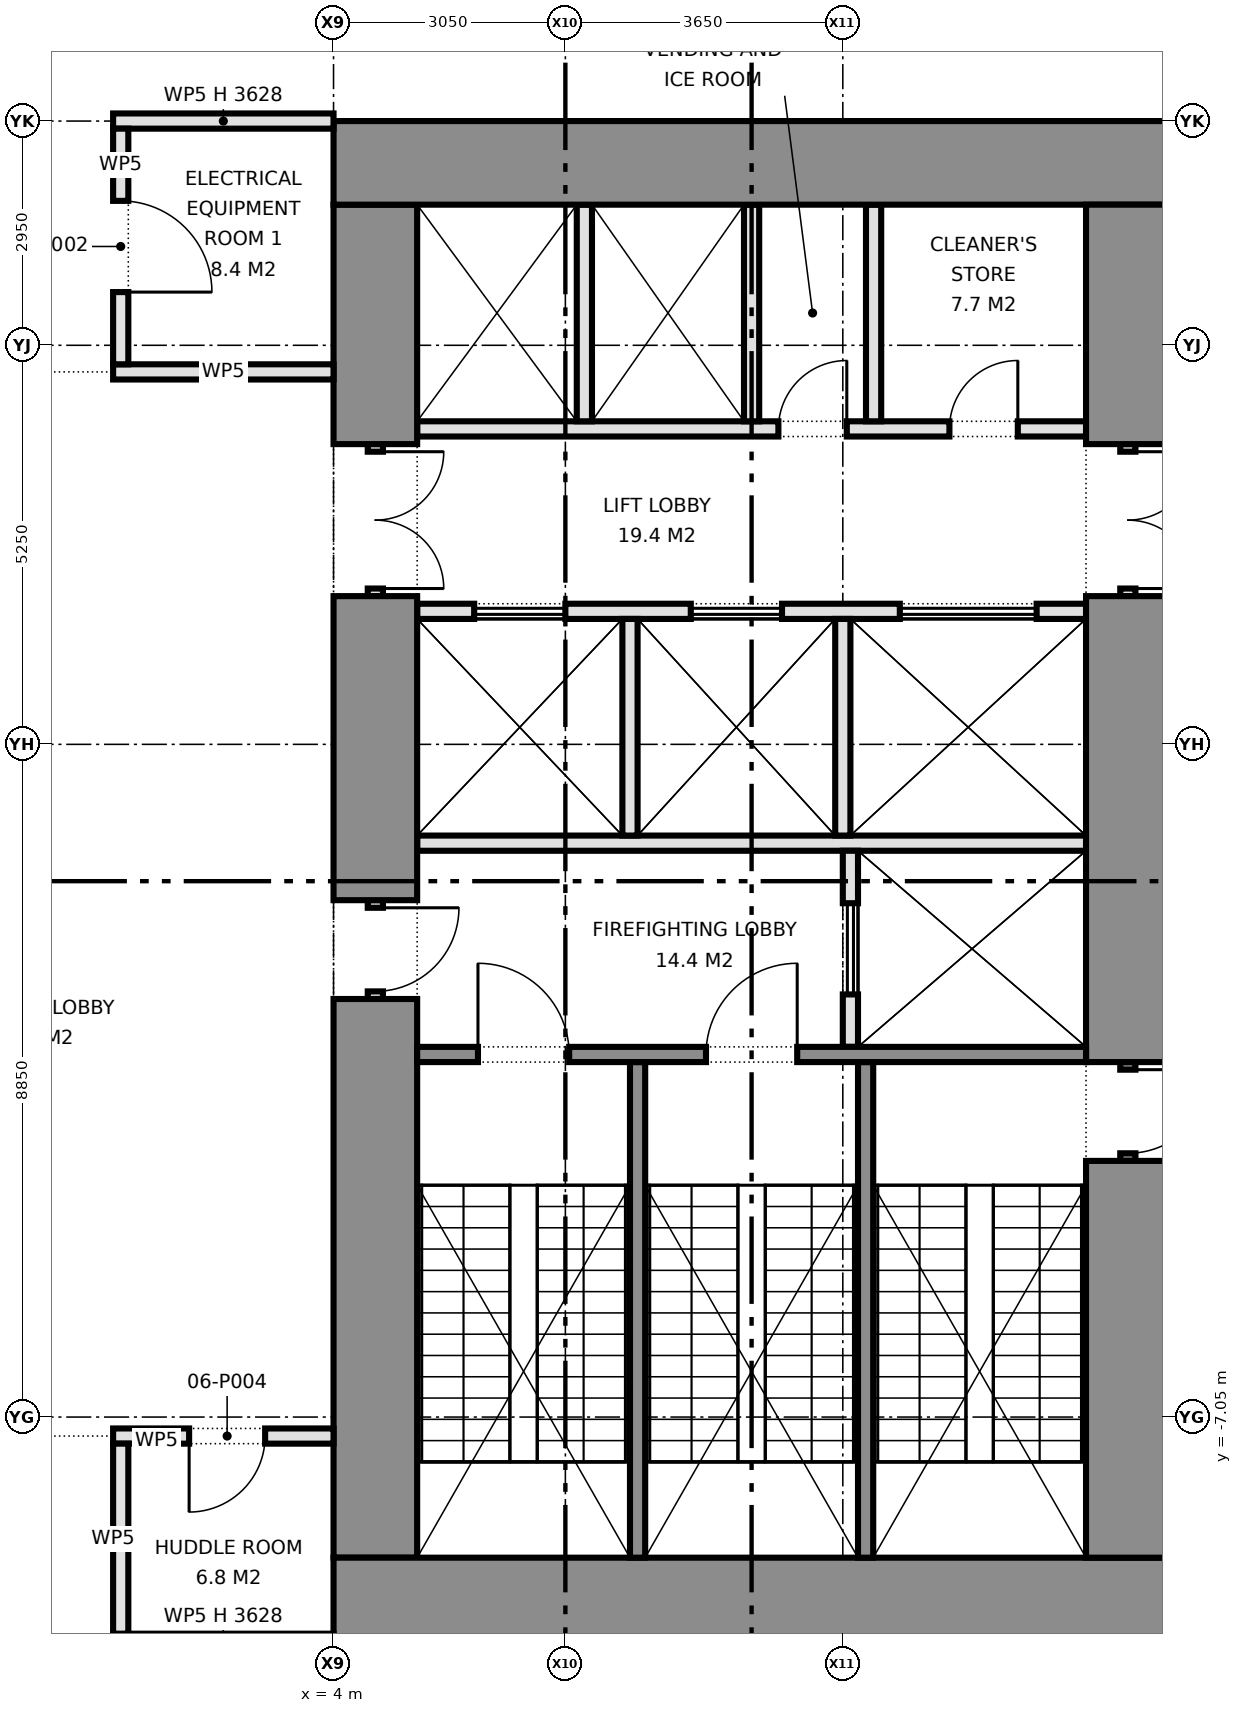
"""IFC4 building model, lengths in metres.
Left out: names, types, materials, properties, quantities, classifications, styles, units other than length and angle.
Written with IfcOpenShell. Run it as: python <this file> out.ifc"""

import sys

from ifc_helpers import new_model, si_unit, direction, frame, frame_2d, origin, place, context, subcontext, project, spatial, rectangle, extrude, element, fill, save


model = new_model("IFC4")
c1 = context("Model", 3, precision=1e-05, world=origin(), true_north=direction((0.0, 1.0)))
c2 = subcontext(c1, "Body", "Model", "MODEL_VIEW")
j1 = project(units=[si_unit("LENGTHUNIT", "METRE"), si_unit("PLANEANGLEUNIT", "RADIAN")], contexts=[c1])
p1 = place(None, origin())
s1 = spatial("IfcSite", under=j1, at=p1, CompositionType="ELEMENT")
p2 = place(p1, origin())
s2 = spatial("IfcBuilding", under=s1, at=p2, CompositionType="ELEMENT")
p3 = place(p2, frame((0.0, 0.0, 25.7)))
s3 = spatial("IfcBuildingStorey", under=s2, at=p3, CompositionType="ELEMENT", Elevation=25.7)
for number, where, z_axis, x_axis in (
    (1, (15.0, 9.45, 0.0), (0.0, 0.0, 1.0), (-1.0, 0.0, 0.0)),
    (2, (15.0, -9.45, 0.0), (0.0, 0.0, 1.0), (-1.0, 0.0, 0.0)),
):
    element("IfcWall", number, at=place(p3, frame(where, z_axis=z_axis, x_axis=x_axis)), inside=s3, PredefinedType="SHEAR", context=c2, shape_type="SweptSolid", body=[
        extrude(rectangle(XDim=11.0, YDim=1.1, at=frame_2d((5.5, 0.0))), origin(), (0.0, 0.0, 1.0), 4.575),
    ])
p4 = place(p3, frame((14.45, 8.9, 0.0), z_axis=(0.0, 0.0, 1.0), x_axis=(0.0, -1.0, 0.0)))
e3 = element("IfcWall", 3, at=p4, inside=s3, PredefinedType="SHEAR", context=c2, shape_type="SweptSolid", body=[
    extrude(rectangle(XDim=3.15, YDim=1.1, at=frame_2d((1.575, 0.0))), origin(), (0.0, 0.0, 1.0), 4.575),
])
p5 = place(p3, frame((14.45, 5.75, 0.0), z_axis=(0.0, 0.0, 1.0), x_axis=(0.0, -1.0, 0.0)))
e4 = element("IfcWall", 4, at=p5, inside=s3, PredefinedType="PARTITIONING", context=c2, shape_type="SweptSolid", body=[
    extrude(rectangle(XDim=2.0, YDim=0.2, at=frame_2d((1.0, 0.0))), origin(), (0.0, 0.0, 1.0), 2.4),
])
p6 = place(p5, frame((0.1, 0.0, 0.0)))
e5 = element("IfcOpeningElement", 5, at=p6, cuts=e4, PredefinedType="OPENING", context=c2, shape_type="SweptSolid", body=[
    extrude(rectangle(XDim=1.8, YDim=2.1, at=frame_2d((0.9, 1.05))), frame((0.0, 0.11, 0.0), z_axis=(0.0, -1.0, 0.0), x_axis=(1.0, 0.0, 0.0)), (0.0, 0.0, 1.0), 0.22),
])
p7 = place(p3, frame((14.45, 3.75, 0.0), z_axis=(0.0, 0.0, 1.0), x_axis=(0.0, -1.0, 0.0)))
e6 = element("IfcWall", 6, at=p7, inside=s3, PredefinedType="SHEAR", context=c2, shape_type="SweptSolid", body=[
    extrude(rectangle(XDim=6.13, YDim=1.1, at=frame_2d((3.065, 0.0))), origin(), (0.0, 0.0, 1.0), 4.575),
])
p8 = place(p3, frame((14.45, -2.38, 0.0), z_axis=(0.0, 0.0, 1.0), x_axis=(0.0, -1.0, 0.0)))
e7 = element("IfcWall", 7, at=p8, inside=s3, PredefinedType="SHEAR", context=c2, shape_type="SweptSolid", body=[
    extrude(rectangle(XDim=1.3, YDim=0.2, at=frame_2d((0.65, 0.0))), origin(), (0.0, 0.0, 1.0), 2.4),
])
p9 = place(p8, frame((0.1, 0.0, 0.0)))
e8 = element("IfcOpeningElement", 8, at=p9, cuts=e7, PredefinedType="OPENING", context=c2, shape_type="SweptSolid", body=[
    extrude(rectangle(XDim=1.1, YDim=2.1, at=frame_2d((0.55, 1.05))), frame((0.0, 0.11, 0.0), z_axis=(0.0, -1.0, 0.0), x_axis=(1.0, 0.0, 0.0)), (0.0, 0.0, 1.0), 0.22),
])
p10 = place(p3, frame((14.45, -3.68, 0.0), z_axis=(0.0, 0.0, 1.0), x_axis=(0.0, -1.0, 0.0)))
e9 = element("IfcWall", 9, at=p10, inside=s3, PredefinedType="SHEAR", context=c2, shape_type="SweptSolid", body=[
    extrude(rectangle(XDim=5.22, YDim=1.1, at=frame_2d((2.61, 0.0))), origin(), (0.0, 0.0, 1.0), 4.575),
])
p11 = place(p3, frame((4.55, 8.9, 0.0), z_axis=(0.0, 0.0, 1.0), x_axis=(0.0, -1.0, 0.0)))
e10 = element("IfcWall", 10, at=p11, inside=s3, PredefinedType="SHEAR", context=c2, shape_type="SweptSolid", body=[
    extrude(rectangle(XDim=3.15, YDim=1.1, at=frame_2d((1.575, 0.0))), origin(), (0.0, 0.0, 1.0), 4.575),
])
p12 = place(p3, frame((4.55, 5.75, 0.0), z_axis=(0.0, 0.0, 1.0), x_axis=(0.0, -1.0, 0.0)))
e11 = element("IfcWall", 11, at=p12, inside=s3, PredefinedType="PARTITIONING", context=c2, shape_type="SweptSolid", body=[
    extrude(rectangle(XDim=2.0, YDim=0.2, at=frame_2d((1.0, 0.0))), origin(), (0.0, 0.0, 1.0), 2.4),
])
p13 = place(p12, frame((0.1, 0.0, 0.0)))
e12 = element("IfcOpeningElement", 12, at=p13, cuts=e11, PredefinedType="OPENING", context=c2, shape_type="SweptSolid", body=[
    extrude(rectangle(XDim=1.8, YDim=2.1, at=frame_2d((0.9, 1.05))), frame((0.0, 0.11, 0.0), z_axis=(0.0, -1.0, 0.0), x_axis=(1.0, 0.0, 0.0)), (0.0, 0.0, 1.0), 0.22),
])
p14 = place(p3, frame((4.55, 3.75, 0.0), z_axis=(0.0, 0.0, 1.0), x_axis=(0.0, -1.0, 0.0)))
e13 = element("IfcWall", 13, at=p14, inside=s3, PredefinedType="SHEAR", context=c2, shape_type="SweptSolid", body=[
    extrude(rectangle(XDim=4.0, YDim=1.1, at=frame_2d((2.0, 0.0))), origin(), (0.0, 0.0, 1.0), 4.575),
])
p15 = place(p3, frame((4.55, -0.25, 0.0), z_axis=(0.0, 0.0, 1.0), x_axis=(0.0, -1.0, 0.0)))
e14 = element("IfcWall", 14, at=p15, inside=s3, PredefinedType="PARTITIONING", context=c2, shape_type="SweptSolid", body=[
    extrude(rectangle(XDim=1.3, YDim=0.2, at=frame_2d((0.65, 0.0))), origin(), (0.0, 0.0, 1.0), 2.4),
])
p16 = place(p15, frame((0.1, 0.0, 0.0)))
e15 = element("IfcOpeningElement", 15, at=p16, cuts=e14, PredefinedType="OPENING", context=c2, shape_type="SweptSolid", body=[
    extrude(rectangle(XDim=1.1, YDim=2.1, at=frame_2d((0.55, 1.05))), frame((0.0, 0.11, 0.0), z_axis=(0.0, -1.0, 0.0), x_axis=(1.0, 0.0, 0.0)), (0.0, 0.0, 1.0), 0.22),
])
p17 = place(p3, frame((4.55, -1.55, 0.0), z_axis=(0.0, 0.0, 1.0), x_axis=(0.0, -1.0, 0.0)))
e16 = element("IfcWall", 16, at=p17, inside=s3, PredefinedType="SHEAR", context=c2, shape_type="SweptSolid", body=[
    extrude(rectangle(XDim=7.35, YDim=1.1, at=frame_2d((3.675, 0.0))), origin(), (0.0, 0.0, 1.0), 4.575),
])
p18 = place(p3, frame((13.9, 5.95, 0.0), z_axis=(0.0, 0.0, 1.0), x_axis=(-1.0, 0.0, 0.0)))
e17 = element("IfcWall", 17, at=p18, inside=s3, PredefinedType="PARTITIONING", context=c2, shape_type="SweptSolid", body=[
    extrude(rectangle(XDim=8.8, YDim=0.2, at=frame_2d((4.4, 0.0))), origin(), (0.0, 0.0, 1.0), 4.575),
])
p19 = place(p18, frame((0.897, 0.0, 0.0)))
e18 = element("IfcOpeningElement", 18, at=p19, cuts=e17, PredefinedType="OPENING", context=c2, shape_type="SweptSolid", body=[
    extrude(rectangle(XDim=0.9, YDim=2.1, at=frame_2d((0.45, 1.05))), frame((0.0, 0.11, 0.0), z_axis=(0.0, -1.0, 0.0), x_axis=(1.0, 0.0, 0.0)), (0.0, 0.0, 1.0), 0.22),
])
p20 = place(p18, frame((3.147, 0.0, 0.0)))
e19 = element("IfcOpeningElement", 19, at=p20, cuts=e17, PredefinedType="OPENING", context=c2, shape_type="SweptSolid", body=[
    extrude(rectangle(XDim=0.9, YDim=2.1, at=frame_2d((0.45, 1.05))), frame((0.0, 0.11, 0.0), z_axis=(0.0, -1.0, 0.0), x_axis=(1.0, 0.0, 0.0)), (0.0, 0.0, 1.0), 0.22),
])
p21 = place(p3, frame((13.9, 3.55, 0.0), z_axis=(0.0, 0.0, 1.0), x_axis=(-1.0, 0.0, 0.0)))
e20 = element("IfcWall", 20, at=p21, inside=s3, PredefinedType="PARTITIONING", context=c2, shape_type="SweptSolid", body=[
    extrude(rectangle(XDim=8.8, YDim=0.2, at=frame_2d((4.4, 0.0))), origin(), (0.0, 0.0, 1.0), 4.575),
])
p22 = place(p21, frame((0.65, 0.0, 0.0)))
e21 = element("IfcOpeningElement", 21, at=p22, cuts=e20, PredefinedType="OPENING", context=c2, shape_type="SweptSolid", body=[
    extrude(rectangle(XDim=1.8, YDim=2.1, at=frame_2d((0.9, 1.05))), frame((0.0, 0.11, 0.0), z_axis=(0.0, -1.0, 0.0), x_axis=(1.0, 0.0, 0.0)), (0.0, 0.0, 1.0), 0.22),
])
p23 = place(p21, frame((4.0, 0.0, 0.0)))
e22 = element("IfcOpeningElement", 22, at=p23, cuts=e20, PredefinedType="OPENING", context=c2, shape_type="SweptSolid", body=[
    extrude(rectangle(XDim=1.2, YDim=2.1, at=frame_2d((0.6, 1.05))), frame((0.0, 0.11, 0.0), z_axis=(0.0, -1.0, 0.0), x_axis=(1.0, 0.0, 0.0)), (0.0, 0.0, 1.0), 0.22),
])
p24 = place(p21, frame((6.85, 0.0, 0.0)))
e23 = element("IfcOpeningElement", 23, at=p24, cuts=e20, PredefinedType="OPENING", context=c2, shape_type="SweptSolid", body=[
    extrude(rectangle(XDim=1.2, YDim=2.1, at=frame_2d((0.6, 1.05))), frame((0.0, 0.11, 0.0), z_axis=(0.0, -1.0, 0.0), x_axis=(1.0, 0.0, 0.0)), (0.0, 0.0, 1.0), 0.22),
])
p25 = place(p3, frame((13.9, 0.5, 0.0), z_axis=(0.0, 0.0, 1.0), x_axis=(-1.0, 0.0, 0.0)))
e24 = element("IfcWall", 24, at=p25, inside=s3, PredefinedType="PARTITIONING", context=c2, shape_type="SweptSolid", body=[
    extrude(rectangle(XDim=8.8, YDim=0.2, at=frame_2d((4.4, 0.0))), origin(), (0.0, 0.0, 1.0), 4.575),
])
p26 = place(p3, frame((10.8, 0.4, 0.0), z_axis=(0.0, 0.0, 1.0), x_axis=(0.0, -1.0, 0.0)))
e25 = element("IfcWall", 25, at=p26, inside=s3, PredefinedType="PARTITIONING", context=c2, shape_type="SweptSolid", body=[
    extrude(rectangle(XDim=2.58, YDim=0.2, at=frame_2d((1.29, 0.0))), origin(), (0.0, 0.0, 1.0), 4.575),
])
p27 = place(p26, frame((0.69, 0.0, 0.0)))
e26 = element("IfcOpeningElement", 26, at=p27, cuts=e25, PredefinedType="OPENING", context=c2, shape_type="SweptSolid", body=[
    extrude(rectangle(XDim=1.2, YDim=2.1, at=frame_2d((0.6, 1.05))), frame((0.0, 0.11, 0.0), z_axis=(0.0, -1.0, 0.0), x_axis=(1.0, 0.0, 0.0)), (0.0, 0.0, 1.0), 0.22),
])
p28 = place(p3, frame((13.9, -2.28, 0.0), z_axis=(0.0, 0.0, 1.0), x_axis=(-1.0, 0.0, 0.0)))
e27 = element("IfcWall", 27, at=p28, inside=s3, PredefinedType="SHEAR", context=c2, shape_type="SweptSolid", body=[
    extrude(rectangle(XDim=8.8, YDim=0.2, at=frame_2d((4.4, 0.0))), origin(), (0.0, 0.0, 1.0), 4.575),
])
p29 = place(p28, frame((3.8, 0.0, 0.0)))
e28 = element("IfcOpeningElement", 28, at=p29, cuts=e27, PredefinedType="OPENING", context=c2, shape_type="SweptSolid", body=[
    extrude(rectangle(XDim=1.2, YDim=2.1, at=frame_2d((0.6, 1.05))), frame((0.0, 0.11, 0.0), z_axis=(0.0, -1.0, 0.0), x_axis=(1.0, 0.0, 0.0)), (0.0, 0.0, 1.0), 0.22),
])
p30 = place(p28, frame((6.8, 0.0, 0.0)))
e29 = element("IfcOpeningElement", 29, at=p30, cuts=e27, PredefinedType="OPENING", context=c2, shape_type="SweptSolid", body=[
    extrude(rectangle(XDim=1.2, YDim=2.1, at=frame_2d((0.6, 1.05))), frame((0.0, 0.11, 0.0), z_axis=(0.0, -1.0, 0.0), x_axis=(1.0, 0.0, 0.0)), (0.0, 0.0, 1.0), 0.22),
])
for number, where, z_axis, x_axis in (
    (30, (11.0, -2.38, 0.0), (0.0, 0.0, 1.0), (0.0, -1.0, 0.0)),
    (31, (8.0, -2.38, 0.0), (0.0, 0.0, 1.0), (0.0, -1.0, 0.0)),
):
    element("IfcWall", number, at=place(p3, frame(where, z_axis=z_axis, x_axis=x_axis)), inside=s3, PredefinedType="SHEAR", context=c2, shape_type="SweptSolid", body=[
        extrude(rectangle(XDim=6.52, YDim=0.2, at=frame_2d((3.26, 0.0))), origin(), (0.0, 0.0, 1.0), 4.575),
    ])
for number, where, z_axis, x_axis in (
    (32, (9.5, 8.9, 0.0), (0.0, 0.0, 1.0), (0.0, -1.0, 0.0)),
    (33, (7.3, 8.9, 0.0), (0.0, 0.0, 1.0), (0.0, -1.0, 0.0)),
    (34, (11.105, 8.9, 0.0), (0.0, 0.0, 1.0), (0.0, -1.0, 0.0)),
    (35, (10.7, 3.45, 0.0), (0.0, 0.0, 1.0), (0.0, -1.0, 0.0)),
    (36, (7.9, 3.45, 0.0), (0.0, 0.0, 1.0), (0.0, -1.0, 0.0)),
):
    element("IfcWall", number, at=place(p3, frame(where, z_axis=z_axis, x_axis=x_axis)), inside=s3, PredefinedType="PARTITIONING", context=c2, shape_type="SweptSolid", body=[
        extrude(rectangle(XDim=2.85, YDim=0.2, at=frame_2d((1.425, 0.0))), origin(), (0.0, 0.0, 1.0), 4.575),
    ])
p31 = place(p3, frame((1.1, -7.3, 0.0), z_axis=(0.0, 0.0, 1.0), x_axis=(1.0, 0.0, 0.0)))
e37 = element("IfcWall", 37, at=p31, inside=s3, PredefinedType="PARTITIONING", context=c2, shape_type="SweptSolid", body=[
    extrude(rectangle(XDim=2.9, YDim=0.2, at=frame_2d((1.45, 0.0))), origin(), (0.0, 0.0, 1.0), 4.575),
])
p32 = place(p31, frame((1.0, 0.0, 0.0)))
e38 = element("IfcOpeningElement", 38, at=p32, cuts=e37, PredefinedType="OPENING", context=c2, shape_type="SweptSolid", body=[
    extrude(rectangle(XDim=1.0, YDim=2.1, at=frame_2d((0.5, 1.05))), frame((0.0, 0.11, 0.0), z_axis=(0.0, -1.0, 0.0), x_axis=(1.0, 0.0, 0.0)), (0.0, 0.0, 1.0), 0.22),
])
p33 = place(p3, frame((1.1, 6.7, 0.0), z_axis=(0.0, 0.0, 1.0), x_axis=(1.0, 0.0, 0.0)))
e39 = element("IfcWall", 39, at=p33, inside=s3, PredefinedType="PARTITIONING", context=c2, shape_type="SweptSolid", body=[
    extrude(rectangle(XDim=2.9, YDim=0.2, at=frame_2d((1.45, 0.0))), origin(), (0.0, 0.0, 1.0), 4.575),
])
p34 = place(p3, frame((1.1, 10.0, 0.0), z_axis=(0.0, 0.0, 1.0), x_axis=(1.0, 0.0, 0.0)))
e40 = element("IfcWall", 40, at=p34, inside=s3, PredefinedType="PARTITIONING", context=c2, shape_type="SweptSolid", body=[
    extrude(rectangle(XDim=2.9, YDim=0.2, at=frame_2d((1.45, 0.0))), origin(), (0.0, 0.0, 1.0), 3.628),
])
p35 = place(p3, frame((1.2, -9.9, 0.0), z_axis=(0.0, 0.0, 1.0), x_axis=(0.0, 1.0, 0.0)))
e41 = element("IfcWall", 41, at=p35, inside=s3, PredefinedType="PARTITIONING", context=c2, shape_type="SweptSolid", body=[
    extrude(rectangle(XDim=2.5, YDim=0.2, at=frame_2d((1.25, 0.0))), origin(), (0.0, 0.0, 1.0), 4.575),
])
p36 = place(p3, frame((1.2, 6.8, 0.0), z_axis=(0.0, 0.0, 1.0), x_axis=(0.0, 1.0, 0.0)))
e42 = element("IfcWall", 42, at=p36, inside=s3, PredefinedType="PARTITIONING", context=c2, shape_type="SweptSolid", body=[
    extrude(rectangle(XDim=3.1, YDim=0.2, at=frame_2d((1.55, 0.0))), origin(), (0.0, 0.0, 1.0), 4.575),
])
p37 = place(p36, frame((0.95, 0.0, 0.0)))
e43 = element("IfcOpeningElement", 43, at=p37, cuts=e42, PredefinedType="OPENING", context=c2, shape_type="SweptSolid", body=[
    extrude(rectangle(XDim=1.2, YDim=2.1, at=frame_2d((0.6, 1.05))), frame((0.0, 0.11, 0.0), z_axis=(0.0, -1.0, 0.0), x_axis=(1.0, 0.0, 0.0)), (0.0, 0.0, 1.0), 0.22),
])
p38 = place(p6, origin())
e44 = element("IfcDoor", 44, at=p38, inside=s3, OperationType="DOUBLE_DOOR_SINGLE_SWING", PredefinedType="DOOR", context=c2, shape_type="SweptSolid", body=[
    extrude(rectangle(XDim=1.8, YDim=2.1, at=frame_2d((0.9, 1.05))), frame((0.0, 0.025, 0.0), z_axis=(0.0, -1.0, 0.0), x_axis=(1.0, 0.0, 0.0)), (0.0, 0.0, 1.0), 0.05),
])
fill(e5, e44)
p39 = place(p9, origin())
e45 = element("IfcDoor", 45, at=p39, inside=s3, OperationType="SINGLE_SWING_LEFT", PredefinedType="DOOR", context=c2, shape_type="SweptSolid", body=[
    extrude(rectangle(XDim=1.1, YDim=2.1, at=frame_2d((0.55, 1.05))), frame((0.0, 0.025, 0.0), z_axis=(0.0, -1.0, 0.0), x_axis=(1.0, 0.0, 0.0)), (0.0, 0.0, 1.0), 0.05),
])
fill(e8, e45)
p40 = place(p13, origin())
e46 = element("IfcDoor", 46, at=p40, inside=s3, OperationType="DOUBLE_DOOR_SINGLE_SWING", PredefinedType="DOOR", context=c2, shape_type="SweptSolid", body=[
    extrude(rectangle(XDim=1.8, YDim=2.1, at=frame_2d((0.9, 1.05))), frame((0.0, 0.025, 0.0), z_axis=(0.0, -1.0, 0.0), x_axis=(1.0, 0.0, 0.0)), (0.0, 0.0, 1.0), 0.05),
])
fill(e12, e46)
p41 = place(p16, origin())
e47 = element("IfcDoor", 47, at=p41, inside=s3, OperationType="SINGLE_SWING_LEFT", PredefinedType="DOOR", context=c2, shape_type="SweptSolid", body=[
    extrude(rectangle(XDim=1.1, YDim=2.1, at=frame_2d((0.55, 1.05))), frame((0.0, 0.025, 0.0), z_axis=(0.0, -1.0, 0.0), x_axis=(1.0, 0.0, 0.0)), (0.0, 0.0, 1.0), 0.05),
])
fill(e15, e47)
p42 = place(p22, origin())
e48 = element("IfcDoor", 48, at=p42, inside=s3, OperationType="DOUBLE_DOOR_SLIDING", PredefinedType="DOOR", context=c2, shape_type="SweptSolid", body=[
    extrude(rectangle(XDim=1.8, YDim=2.1, at=frame_2d((0.9, 1.05))), frame((0.0, 0.025, 0.0), z_axis=(0.0, -1.0, 0.0), x_axis=(1.0, 0.0, 0.0)), (0.0, 0.0, 1.0), 0.05),
])
fill(e21, e48)
p43 = place(p23, origin())
e49 = element("IfcDoor", 49, at=p43, inside=s3, OperationType="DOUBLE_DOOR_SLIDING", PredefinedType="DOOR", context=c2, shape_type="SweptSolid", body=[
    extrude(rectangle(XDim=1.2, YDim=2.1, at=frame_2d((0.6, 1.05))), frame((0.0, 0.025, 0.0), z_axis=(0.0, -1.0, 0.0), x_axis=(1.0, 0.0, 0.0)), (0.0, 0.0, 1.0), 0.05),
])
fill(e22, e49)
p44 = place(p24, origin())
e50 = element("IfcDoor", 50, at=p44, inside=s3, OperationType="DOUBLE_DOOR_SLIDING", PredefinedType="DOOR", context=c2, shape_type="SweptSolid", body=[
    extrude(rectangle(XDim=1.2, YDim=2.1, at=frame_2d((0.6, 1.05))), frame((0.0, 0.025, 0.0), z_axis=(0.0, -1.0, 0.0), x_axis=(1.0, 0.0, 0.0)), (0.0, 0.0, 1.0), 0.05),
])
fill(e23, e50)
p45 = place(p27, origin())
e51 = element("IfcDoor", 51, at=p45, inside=s3, OperationType="DOUBLE_DOOR_SLIDING", PredefinedType="DOOR", context=c2, shape_type="SweptSolid", body=[
    extrude(rectangle(XDim=1.2, YDim=2.1, at=frame_2d((0.6, 1.05))), frame((0.0, 0.025, 0.0), z_axis=(0.0, -1.0, 0.0), x_axis=(1.0, 0.0, 0.0)), (0.0, 0.0, 1.0), 0.05),
])
fill(e26, e51)
p46 = place(p19, frame((0.9, 0.0, 0.0), z_axis=(0.0, 0.0, 1.0), x_axis=(-1.0, 0.0, 0.0)))
e52 = element("IfcDoor", 52, at=p46, inside=s3, OperationType="SINGLE_SWING_RIGHT", PredefinedType="DOOR", context=c2, shape_type="SweptSolid", body=[
    extrude(rectangle(XDim=0.9, YDim=2.1, at=frame_2d((0.45, 1.05))), frame((0.0, 0.025, 0.0), z_axis=(0.0, -1.0, 0.0), x_axis=(1.0, 0.0, 0.0)), (0.0, 0.0, 1.0), 0.05),
])
fill(e18, e52)
p47 = place(p20, frame((0.9, 0.0, 0.0), z_axis=(0.0, 0.0, 1.0), x_axis=(-1.0, 0.0, 0.0)))
e53 = element("IfcDoor", 53, at=p47, inside=s3, OperationType="SINGLE_SWING_RIGHT", PredefinedType="DOOR", context=c2, shape_type="SweptSolid", body=[
    extrude(rectangle(XDim=0.9, YDim=2.1, at=frame_2d((0.45, 1.05))), frame((0.0, 0.025, 0.0), z_axis=(0.0, -1.0, 0.0), x_axis=(1.0, 0.0, 0.0)), (0.0, 0.0, 1.0), 0.05),
])
fill(e19, e53)
p48 = place(p29, frame((1.2, 0.0, 0.0), z_axis=(0.0, 0.0, 1.0), x_axis=(-1.0, 0.0, 0.0)))
e54 = element("IfcDoor", 54, at=p48, inside=s3, OperationType="SINGLE_SWING_RIGHT", PredefinedType="DOOR", context=c2, shape_type="SweptSolid", body=[
    extrude(rectangle(XDim=1.2, YDim=2.1, at=frame_2d((0.6, 1.05))), frame((0.0, 0.025, 0.0), z_axis=(0.0, -1.0, 0.0), x_axis=(1.0, 0.0, 0.0)), (0.0, 0.0, 1.0), 0.05),
])
fill(e28, e54)
p49 = place(p30, frame((1.2, 0.0, 0.0), z_axis=(0.0, 0.0, 1.0), x_axis=(-1.0, 0.0, 0.0)))
e55 = element("IfcDoor", 55, at=p49, inside=s3, OperationType="SINGLE_SWING_LEFT", PredefinedType="DOOR", context=c2, shape_type="SweptSolid", body=[
    extrude(rectangle(XDim=1.2, YDim=2.1, at=frame_2d((0.6, 1.05))), frame((0.0, 0.025, 0.0), z_axis=(0.0, -1.0, 0.0), x_axis=(1.0, 0.0, 0.0)), (0.0, 0.0, 1.0), 0.05),
])
fill(e29, e55)
p50 = place(p37, frame((1.2, 0.0, 0.0), z_axis=(0.0, 0.0, 1.0), x_axis=(-1.0, 0.0, 0.0)))
e56 = element("IfcDoor", 56, at=p50, inside=s3, OperationType="SINGLE_SWING_RIGHT", PredefinedType="DOOR", context=c2, shape_type="SweptSolid", body=[
    extrude(rectangle(XDim=1.2, YDim=2.1, at=frame_2d((0.6, 1.05))), frame((0.0, 0.025, 0.0), z_axis=(0.0, -1.0, 0.0), x_axis=(1.0, 0.0, 0.0)), (0.0, 0.0, 1.0), 0.05),
])
fill(e43, e56)
p51 = place(p32, frame((1.0, 0.0, 0.0), z_axis=(0.0, 0.0, 1.0), x_axis=(-1.0, 0.0, 0.0)))
e57 = element("IfcDoor", 57, at=p51, inside=s3, OperationType="SINGLE_SWING_RIGHT", PredefinedType="DOOR", context=c2, shape_type="SweptSolid", body=[
    extrude(rectangle(XDim=1.0, YDim=2.1, at=frame_2d((0.5, 1.05))), frame((0.0, 0.025, 0.0), z_axis=(0.0, -1.0, 0.0), x_axis=(1.0, 0.0, 0.0)), (0.0, 0.0, 1.0), 0.05),
])
fill(e38, e57)
save(model, sys.argv[1])
